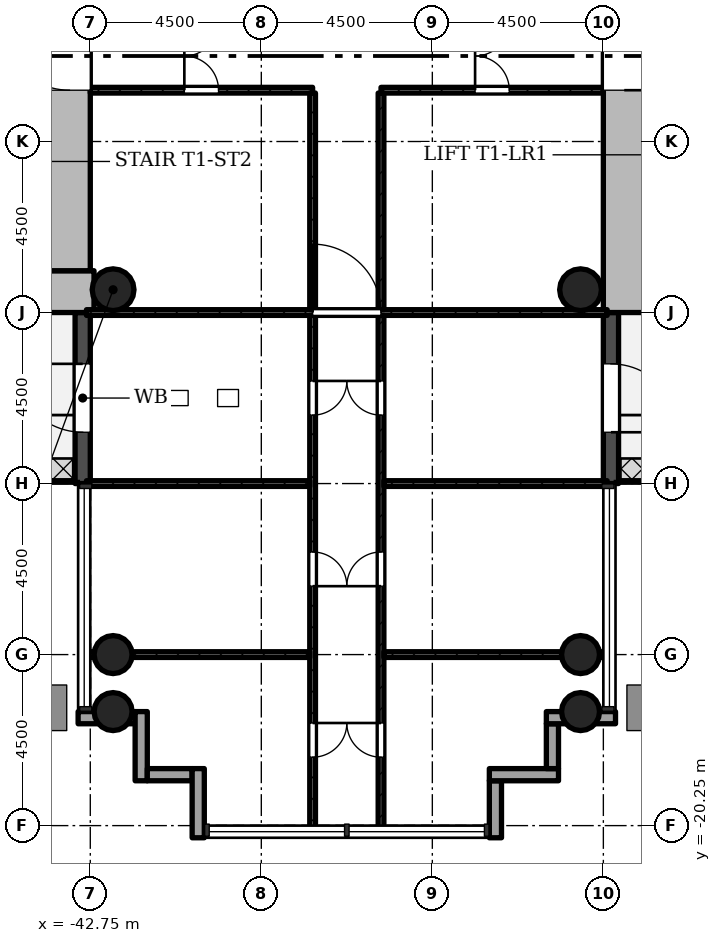
"""IFC4 building model, lengths in metres.
Left out: names, types, materials, properties, quantities, classifications, styles, units other than length and angle.
Written with IfcOpenShell. Run it as: python <this file> out.ifc"""

import sys

from ifc_helpers import new_model, si_unit, direction, frame, frame_2d, origin, origin_2d, place, context, subcontext, project, spatial, rectangle, hollow_circle, extrude, element, fill, save


model = new_model("IFC4")
c1 = context("Model", 3, precision=1e-05, world=origin(), true_north=direction((0.0, 1.0)))
c2 = subcontext(c1, "Body", "Model", "MODEL_VIEW")
j1 = project(units=[si_unit("LENGTHUNIT", "METRE"), si_unit("PLANEANGLEUNIT", "RADIAN")], contexts=[c1])
p1 = place(None, origin())
s1 = spatial("IfcSite", under=j1, at=p1, CompositionType="ELEMENT")
p2 = place(p1, origin())
s2 = spatial("IfcBuilding", under=s1, at=p2, CompositionType="ELEMENT")
p3 = place(p2, frame((0.0, 0.0, 72.1)))
s3 = spatial("IfcBuildingStorey", under=s2, at=p3, CompositionType="ELEMENT", Elevation=72.1)
p4 = place(p3, frame((-28.7, 5.65, 0.0), z_axis=(0.0, 0.0, 1.0), x_axis=(0.0, -1.0, 0.0)))
e1 = element("IfcWall", 1, at=p4, inside=s3, PredefinedType="SHEAR", context=c2, shape_type="SweptSolid", body=[
    extrude(rectangle(XDim=12.4, YDim=1.1, at=frame_2d((6.2, 0.0))), origin(), (0.0, 0.0, 1.0), 4.5),
])
p5 = place(p4, frame((4.75, 0.0, 0.0)))
e2 = element("IfcOpeningElement", 2, at=p5, cuts=e1, PredefinedType="OPENING", context=c2, shape_type="SweptSolid", body=[
    extrude(rectangle(XDim=1.8, YDim=2.1, at=frame_2d((0.9, 1.05))), frame((0.0, 0.56, 0.0), z_axis=(0.0, -1.0, 0.0), x_axis=(1.0, 0.0, 0.0)), (0.0, 0.0, 1.0), 1.12),
])
p6 = place(p3, frame((-50.65, -6.2, 0.0), z_axis=(0.0, 0.0, 1.0), x_axis=(1.0, 0.0, 0.0)))
e3 = element("IfcWall", 3, at=p6, inside=s3, PredefinedType="SHEAR", context=c2, shape_type="SweptSolid", body=[
    extrude(rectangle(XDim=7.998, YDim=1.1, at=frame_2d((3.999, 0.0))), origin(), (0.0, 0.0, 1.0), 4.5),
])
p7 = place(p3, frame((-43.3, -5.65, 0.0), z_axis=(0.0, 0.0, 1.0), x_axis=(0.0, 1.0, 0.0)))
e4 = element("IfcWall", 4, at=p7, inside=s3, PredefinedType="SHEAR", context=c2, shape_type="SweptSolid", body=[
    extrude(rectangle(XDim=12.4, YDim=1.1, at=frame_2d((6.2, 0.0))), origin(), (0.0, 0.0, 1.0), 4.5),
])
p8 = place(p7, frame((4.75, 0.0, 0.0)))
e5 = element("IfcOpeningElement", 5, at=p8, cuts=e4, PredefinedType="OPENING", context=c2, shape_type="SweptSolid", body=[
    extrude(rectangle(XDim=1.8, YDim=2.1, at=frame_2d((0.9, 1.05))), frame((0.0, 0.56, 0.0), z_axis=(0.0, -1.0, 0.0), x_axis=(1.0, 0.0, 0.0)), (0.0, 0.0, 1.0), 1.12),
])
for number, where, z_axis, x_axis in (
    (6, (-42.15, -15.75, 0.0), (0.0, 0.0, 1.0), (1.0, 0.0, 0.0)),
    (7, (-29.85, -15.75, 0.0), (0.0, 0.0, 1.0), (1.0, 0.0, 0.0)),
    (8, (-42.15, -17.25, 0.0), (0.0, 0.0, 1.0), (1.0, 0.0, 0.0)),
    (9, (-29.85, -17.25, 0.0), (0.0, 0.0, 1.0), (1.0, 0.0, 0.0)),
):
    element("IfcColumn", number, at=place(p3, frame(where, z_axis=z_axis, x_axis=x_axis)), inside=s3, PredefinedType="COLUMN", context=c2, shape_type="SweptSolid", body=[
        extrude(hollow_circle(Radius=0.5, WallThickness=0.036, at=origin_2d()), origin(), (0.0, 0.0, 1.0), 4.5),
    ])
for number, where, z_axis, x_axis in (
    (10, (-42.15, -6.15, 0.0), (0.0, 0.0, 1.0), (1.0, 0.0, 0.0)),
    (11, (-29.85, -6.15, 0.0), (0.0, 0.0, 1.0), (1.0, 0.0, 0.0)),
):
    element("IfcColumn", number, at=place(p3, frame(where, z_axis=z_axis, x_axis=x_axis)), inside=s3, PredefinedType="COLUMN", context=c2, shape_type="SweptSolid", body=[
        extrude(hollow_circle(Radius=0.55, WallThickness=0.04, at=origin_2d()), origin(), (0.0, 0.0, 1.0), 4.5),
    ])
p9 = place(p3, frame((-42.95, -6.75, -0.02), z_axis=(0.0, 0.0, 1.0), x_axis=(0.0, -1.0, 0.0)))
e12 = element("IfcWall", 12, at=p9, inside=s3, PredefinedType="STANDARD", context=c2, shape_type="SweptSolid", body=[
    extrude(rectangle(XDim=4.5, YDim=0.4, at=frame_2d((2.25, 0.0))), origin(), (0.0, 0.0, 1.0), 4.22),
])
p10 = place(p9, frame((1.35, 0.0, 0.02)))
e13 = element("IfcOpeningElement", 13, at=p10, cuts=e12, PredefinedType="OPENING", context=c2, shape_type="SweptSolid", body=[
    extrude(rectangle(XDim=1.8, YDim=2.1, at=frame_2d((0.9, 1.05))), frame((0.0, 0.21, 0.0), z_axis=(0.0, -1.0, 0.0), x_axis=(1.0, 0.0, 0.0)), (0.0, 0.0, 1.0), 0.42),
])
p11 = place(p3, frame((-43.07, -17.41, -0.3), z_axis=(0.0, 0.0, 1.0), x_axis=(1.0, 0.0, 0.0)))
e14 = element("IfcWall", 14, at=p11, inside=s3, PredefinedType="STANDARD", context=c2, shape_type="SweptSolid", body=[
    extrude(rectangle(XDim=1.5, YDim=0.32, at=frame_2d((0.75, 0.0))), origin(), (0.0, 0.0, 1.0), 4.5),
])
p12 = place(p3, frame((-41.41, -17.25, -0.3), z_axis=(0.0, 0.0, 1.0), x_axis=(0.0, -1.0, 0.0)))
e15 = element("IfcWall", 15, at=p12, inside=s3, PredefinedType="STANDARD", context=c2, shape_type="SweptSolid", body=[
    extrude(rectangle(XDim=1.82, YDim=0.32, at=frame_2d((0.91, 0.0))), origin(), (0.0, 0.0, 1.0), 4.5),
])
p13 = place(p3, frame((-41.25, -18.91, -0.3), z_axis=(0.0, 0.0, 1.0), x_axis=(1.0, 0.0, 0.0)))
e16 = element("IfcWall", 16, at=p13, inside=s3, PredefinedType="STANDARD", context=c2, shape_type="SweptSolid", body=[
    extrude(rectangle(XDim=1.18, YDim=0.32, at=frame_2d((0.59, 0.0))), origin(), (0.0, 0.0, 1.0), 4.5),
])
p14 = place(p3, frame((-39.91, -18.75, -0.3), z_axis=(0.0, 0.0, 1.0), x_axis=(0.0, -1.0, 0.0)))
e17 = element("IfcWall", 17, at=p14, inside=s3, PredefinedType="STANDARD", context=c2, shape_type="SweptSolid", body=[
    extrude(rectangle(XDim=1.82, YDim=0.32, at=frame_2d((0.91, 0.0))), origin(), (0.0, 0.0, 1.0), 4.5),
])
p15 = place(p3, frame((-32.09, -20.57, -0.3), z_axis=(0.0, 0.0, 1.0), x_axis=(0.0, 1.0, 0.0)))
e18 = element("IfcWall", 18, at=p15, inside=s3, PredefinedType="STANDARD", context=c2, shape_type="SweptSolid", body=[
    extrude(rectangle(XDim=1.5, YDim=0.32, at=frame_2d((0.75, 0.0))), origin(), (0.0, 0.0, 1.0), 4.5),
])
p16 = place(p3, frame((-32.25, -18.91, -0.3), z_axis=(0.0, 0.0, 1.0), x_axis=(1.0, 0.0, 0.0)))
e19 = element("IfcWall", 19, at=p16, inside=s3, PredefinedType="STANDARD", context=c2, shape_type="SweptSolid", body=[
    extrude(rectangle(XDim=1.82, YDim=0.32, at=frame_2d((0.91, 0.0))), origin(), (0.0, 0.0, 1.0), 4.5),
])
p17 = place(p3, frame((-30.59, -18.75, -0.3), z_axis=(0.0, 0.0, 1.0), x_axis=(0.0, 1.0, 0.0)))
e20 = element("IfcWall", 20, at=p17, inside=s3, PredefinedType="STANDARD", context=c2, shape_type="SweptSolid", body=[
    extrude(rectangle(XDim=1.18, YDim=0.32, at=frame_2d((0.59, 0.0))), origin(), (0.0, 0.0, 1.0), 4.5),
])
p18 = place(p3, frame((-30.75, -17.41, -0.3), z_axis=(0.0, 0.0, 1.0), x_axis=(1.0, 0.0, 0.0)))
e21 = element("IfcWall", 21, at=p18, inside=s3, PredefinedType="STANDARD", context=c2, shape_type="SweptSolid", body=[
    extrude(rectangle(XDim=1.82, YDim=0.32, at=frame_2d((0.91, 0.0))), origin(), (0.0, 0.0, 1.0), 4.5),
])
p19 = place(p3, frame((-29.05, -11.25, -0.02), z_axis=(0.0, 0.0, 1.0), x_axis=(0.0, 1.0, 0.0)))
e22 = element("IfcWall", 22, at=p19, inside=s3, PredefinedType="STANDARD", context=c2, shape_type="SweptSolid", body=[
    extrude(rectangle(XDim=4.5, YDim=0.4, at=frame_2d((2.25, 0.0))), origin(), (0.0, 0.0, 1.0), 4.22),
])
p20 = place(p19, frame((1.35, 0.0, 0.02)))
e23 = element("IfcOpeningElement", 23, at=p20, cuts=e22, PredefinedType="OPENING", context=c2, shape_type="SweptSolid", body=[
    extrude(rectangle(XDim=1.8, YDim=2.1, at=frame_2d((0.9, 1.05))), frame((0.0, 0.21, 0.0), z_axis=(0.0, -1.0, 0.0), x_axis=(1.0, 0.0, 0.0)), (0.0, 0.0, 1.0), 0.42),
])
p21 = place(p3, frame((-35.1, -0.9, 0.0), z_axis=(0.0, 0.0, 1.0), x_axis=(1.0, 0.0, 0.0)))
e24 = element("IfcWall", 24, at=p21, inside=s3, PredefinedType="PARTITIONING", context=c2, shape_type="SweptSolid", body=[
    extrude(rectangle(XDim=5.85, YDim=0.15, at=frame_2d((2.925, 0.0))), origin(), (0.0, 0.0, 1.0), 4.08),
])
p22 = place(p21, frame((2.475, 0.0, 0.0)))
e25 = element("IfcOpeningElement", 25, at=p22, cuts=e24, PredefinedType="OPENING", context=c2, shape_type="SweptSolid", body=[
    extrude(rectangle(XDim=0.9, YDim=2.1, at=frame_2d((0.45, 1.05))), frame((0.0, 0.085, 0.0), z_axis=(0.0, -1.0, 0.0), x_axis=(1.0, 0.0, 0.0)), (0.0, 0.0, 1.0), 0.17),
])
p23 = place(p3, frame((-35.1, -6.675, 0.0), z_axis=(0.0, 0.0, 1.0), x_axis=(0.0, 1.0, 0.0)))
e26 = element("IfcWall", 26, at=p23, inside=s3, PredefinedType="PARTITIONING", context=c2, shape_type="SweptSolid", body=[
    extrude(rectangle(XDim=5.7, YDim=0.15, at=frame_2d((2.85, 0.0))), origin(), (0.0, 0.0, 1.0), 4.08),
])
p24 = place(p3, frame((-42.75, -0.9, 0.0), z_axis=(0.0, 0.0, 1.0), x_axis=(1.0, 0.0, 0.0)))
e27 = element("IfcWall", 27, at=p24, inside=s3, PredefinedType="PARTITIONING", context=c2, shape_type="SweptSolid", body=[
    extrude(rectangle(XDim=5.85, YDim=0.15, at=frame_2d((2.925, 0.0))), origin(), (0.0, 0.0, 1.0), 4.08),
])
p25 = place(p24, frame((2.475, 0.0, 0.0)))
e28 = element("IfcOpeningElement", 28, at=p25, cuts=e27, PredefinedType="OPENING", context=c2, shape_type="SweptSolid", body=[
    extrude(rectangle(XDim=0.9, YDim=2.1, at=frame_2d((0.45, 1.05))), frame((0.0, 0.085, 0.0), z_axis=(0.0, -1.0, 0.0), x_axis=(1.0, 0.0, 0.0)), (0.0, 0.0, 1.0), 0.17),
])
p26 = place(p3, frame((-36.9, -6.675, 0.0), z_axis=(0.0, 0.0, 1.0), x_axis=(0.0, 1.0, 0.0)))
e29 = element("IfcWall", 29, at=p26, inside=s3, PredefinedType="PARTITIONING", context=c2, shape_type="SweptSolid", body=[
    extrude(rectangle(XDim=5.7, YDim=0.15, at=frame_2d((2.85, 0.0))), origin(), (0.0, 0.0, 1.0), 4.08),
])
p27 = place(p3, frame((-42.85, -6.75, 0.0), z_axis=(0.0, 0.0, 1.0), x_axis=(1.0, 0.0, 0.0)))
e30 = element("IfcWall", 30, at=p27, inside=s3, PredefinedType="PARTITIONING", context=c2, shape_type="SweptSolid", body=[
    extrude(rectangle(XDim=13.7, YDim=0.15, at=frame_2d((6.85, 0.0))), origin(), (0.0, 0.0, 1.0), 4.08),
])
p28 = place(p27, frame((5.95, 0.0, 0.0)))
e31 = element("IfcOpeningElement", 31, at=p28, cuts=e30, PredefinedType="OPENING", context=c2, shape_type="SweptSolid", body=[
    extrude(rectangle(XDim=1.8, YDim=2.1, at=frame_2d((0.9, 1.05))), frame((0.0, 0.085, 0.0), z_axis=(0.0, -1.0, 0.0), x_axis=(1.0, 0.0, 0.0)), (0.0, 0.0, 1.0), 0.17),
])
p29 = place(p3, frame((-35.1, -20.35, 0.0), z_axis=(0.0, 0.0, 1.0), x_axis=(0.0, 1.0, 0.0)))
e32 = element("IfcWall", 32, at=p29, inside=s3, PredefinedType="PARTITIONING", context=c2, shape_type="SweptSolid", body=[
    extrude(rectangle(XDim=13.525, YDim=0.15, at=frame_2d((6.763, 0.0))), origin(), (0.0, 0.0, 1.0), 4.08),
])
p30 = place(p29, frame((1.9, 0.0, 0.0)))
e33 = element("IfcOpeningElement", 33, at=p30, cuts=e32, PredefinedType="OPENING", context=c2, shape_type="SweptSolid", body=[
    extrude(rectangle(XDim=0.9, YDim=2.1, at=frame_2d((0.45, 1.05))), frame((0.0, 0.085, 0.0), z_axis=(0.0, -1.0, 0.0), x_axis=(1.0, 0.0, 0.0)), (0.0, 0.0, 1.0), 0.17),
])
p31 = place(p29, frame((6.4, 0.0, 0.0)))
e34 = element("IfcOpeningElement", 34, at=p31, cuts=e32, PredefinedType="OPENING", context=c2, shape_type="SweptSolid", body=[
    extrude(rectangle(XDim=0.9, YDim=2.1, at=frame_2d((0.45, 1.05))), frame((0.0, 0.085, 0.0), z_axis=(0.0, -1.0, 0.0), x_axis=(1.0, 0.0, 0.0)), (0.0, 0.0, 1.0), 0.17),
])
p32 = place(p29, frame((10.9, 0.0, 0.0)))
e35 = element("IfcOpeningElement", 35, at=p32, cuts=e32, PredefinedType="OPENING", context=c2, shape_type="SweptSolid", body=[
    extrude(rectangle(XDim=0.9, YDim=2.1, at=frame_2d((0.45, 1.05))), frame((0.0, 0.085, 0.0), z_axis=(0.0, -1.0, 0.0), x_axis=(1.0, 0.0, 0.0)), (0.0, 0.0, 1.0), 0.17),
])
for number, where, z_axis, x_axis in (
    (36, (-35.025, -15.75, 0.0), (0.0, 0.0, 1.0), (1.0, 0.0, 0.0)),
    (37, (-35.025, -11.25, 0.0), (0.0, 0.0, 1.0), (1.0, 0.0, 0.0)),
):
    element("IfcWall", number, at=place(p3, frame(where, z_axis=z_axis, x_axis=x_axis)), inside=s3, PredefinedType="PARTITIONING", context=c2, shape_type="SweptSolid", body=[
        extrude(rectangle(XDim=5.875, YDim=0.15, at=frame_2d((2.938, 0.0))), origin(), (0.0, 0.0, 1.0), 4.08),
    ])
p33 = place(p3, frame((-36.9, -20.35, 0.0), z_axis=(0.0, 0.0, 1.0), x_axis=(0.0, 1.0, 0.0)))
e38 = element("IfcWall", 38, at=p33, inside=s3, PredefinedType="PARTITIONING", context=c2, shape_type="SweptSolid", body=[
    extrude(rectangle(XDim=13.525, YDim=0.15, at=frame_2d((6.763, 0.0))), origin(), (0.0, 0.0, 1.0), 4.08),
])
p34 = place(p33, frame((1.9, 0.0, 0.0)))
e39 = element("IfcOpeningElement", 39, at=p34, cuts=e38, PredefinedType="OPENING", context=c2, shape_type="SweptSolid", body=[
    extrude(rectangle(XDim=0.9, YDim=2.1, at=frame_2d((0.45, 1.05))), frame((0.0, 0.085, 0.0), z_axis=(0.0, -1.0, 0.0), x_axis=(1.0, 0.0, 0.0)), (0.0, 0.0, 1.0), 0.17),
])
p35 = place(p33, frame((6.4, 0.0, 0.0)))
e40 = element("IfcOpeningElement", 40, at=p35, cuts=e38, PredefinedType="OPENING", context=c2, shape_type="SweptSolid", body=[
    extrude(rectangle(XDim=0.9, YDim=2.1, at=frame_2d((0.45, 1.05))), frame((0.0, 0.085, 0.0), z_axis=(0.0, -1.0, 0.0), x_axis=(1.0, 0.0, 0.0)), (0.0, 0.0, 1.0), 0.17),
])
p36 = place(p33, frame((10.9, 0.0, 0.0)))
e41 = element("IfcOpeningElement", 41, at=p36, cuts=e38, PredefinedType="OPENING", context=c2, shape_type="SweptSolid", body=[
    extrude(rectangle(XDim=0.9, YDim=2.1, at=frame_2d((0.45, 1.05))), frame((0.0, 0.085, 0.0), z_axis=(0.0, -1.0, 0.0), x_axis=(1.0, 0.0, 0.0)), (0.0, 0.0, 1.0), 0.17),
])
for number, where, z_axis, x_axis in (
    (42, (-36.975, -15.75, 0.0), (0.0, 0.0, 1.0), (-1.0, 0.0, 0.0)),
    (43, (-36.975, -11.25, 0.0), (0.0, 0.0, 1.0), (-1.0, 0.0, 0.0)),
):
    element("IfcWall", number, at=place(p3, frame(where, z_axis=z_axis, x_axis=x_axis)), inside=s3, PredefinedType="PARTITIONING", context=c2, shape_type="SweptSolid", body=[
        extrude(rectangle(XDim=5.875, YDim=0.15, at=frame_2d((2.938, 0.0))), origin(), (0.0, 0.0, 1.0), 4.08),
    ])
p37 = place(p10, origin())
e44 = element("IfcDoor", 44, at=p37, inside=s3, OperationType="SINGLE_SWING_LEFT", PredefinedType="DOOR", context=c2, shape_type="SweptSolid", body=[
    extrude(rectangle(XDim=1.8, YDim=2.1, at=frame_2d((0.9, 1.05))), frame((0.0, 0.025, 0.0), z_axis=(0.0, -1.0, 0.0), x_axis=(1.0, 0.0, 0.0)), (0.0, 0.0, 1.0), 0.05),
])
fill(e13, e44)
p38 = place(p20, origin())
e45 = element("IfcDoor", 45, at=p38, inside=s3, OperationType="SINGLE_SWING_LEFT", PredefinedType="DOOR", context=c2, shape_type="SweptSolid", body=[
    extrude(rectangle(XDim=1.8, YDim=2.1, at=frame_2d((0.9, 1.05))), frame((0.0, 0.025, 0.0), z_axis=(0.0, -1.0, 0.0), x_axis=(1.0, 0.0, 0.0)), (0.0, 0.0, 1.0), 0.05),
])
fill(e23, e45)
p39 = place(p22, origin())
e46 = element("IfcDoor", 46, at=p39, inside=s3, OperationType="SINGLE_SWING_RIGHT", PredefinedType="DOOR", context=c2, shape_type="SweptSolid", body=[
    extrude(rectangle(XDim=0.9, YDim=2.1, at=frame_2d((0.45, 1.05))), frame((0.0, 0.025, 0.0), z_axis=(0.0, -1.0, 0.0), x_axis=(1.0, 0.0, 0.0)), (0.0, 0.0, 1.0), 0.05),
])
fill(e25, e46)
p40 = place(p25, origin())
e47 = element("IfcDoor", 47, at=p40, inside=s3, OperationType="SINGLE_SWING_RIGHT", PredefinedType="DOOR", context=c2, shape_type="SweptSolid", body=[
    extrude(rectangle(XDim=0.9, YDim=2.1, at=frame_2d((0.45, 1.05))), frame((0.0, 0.025, 0.0), z_axis=(0.0, -1.0, 0.0), x_axis=(1.0, 0.0, 0.0)), (0.0, 0.0, 1.0), 0.05),
])
fill(e28, e47)
p41 = place(p28, origin())
e48 = element("IfcDoor", 48, at=p41, inside=s3, OperationType="SINGLE_SWING_RIGHT", PredefinedType="DOOR", context=c2, shape_type="SweptSolid", body=[
    extrude(rectangle(XDim=1.8, YDim=2.1, at=frame_2d((0.9, 1.05))), frame((0.0, 0.025, 0.0), z_axis=(0.0, -1.0, 0.0), x_axis=(1.0, 0.0, 0.0)), (0.0, 0.0, 1.0), 0.05),
])
fill(e31, e48)
p42 = place(p30, origin())
e49 = element("IfcDoor", 49, at=p42, inside=s3, OperationType="SINGLE_SWING_LEFT", PredefinedType="DOOR", context=c2, shape_type="SweptSolid", body=[
    extrude(rectangle(XDim=0.9, YDim=2.1, at=frame_2d((0.45, 1.05))), frame((0.0, 0.025, 0.0), z_axis=(0.0, -1.0, 0.0), x_axis=(1.0, 0.0, 0.0)), (0.0, 0.0, 1.0), 0.05),
])
fill(e33, e49)
p43 = place(p31, origin())
e50 = element("IfcDoor", 50, at=p43, inside=s3, OperationType="SINGLE_SWING_RIGHT", PredefinedType="DOOR", context=c2, shape_type="SweptSolid", body=[
    extrude(rectangle(XDim=0.9, YDim=2.1, at=frame_2d((0.45, 1.05))), frame((0.0, 0.025, 0.0), z_axis=(0.0, -1.0, 0.0), x_axis=(1.0, 0.0, 0.0)), (0.0, 0.0, 1.0), 0.05),
])
fill(e34, e50)
p44 = place(p32, origin())
e51 = element("IfcDoor", 51, at=p44, inside=s3, OperationType="SINGLE_SWING_LEFT", PredefinedType="DOOR", context=c2, shape_type="SweptSolid", body=[
    extrude(rectangle(XDim=0.9, YDim=2.1, at=frame_2d((0.45, 1.05))), frame((0.0, 0.025, 0.0), z_axis=(0.0, -1.0, 0.0), x_axis=(1.0, 0.0, 0.0)), (0.0, 0.0, 1.0), 0.05),
])
fill(e35, e51)
p45 = place(p34, origin())
e52 = element("IfcDoor", 52, at=p45, inside=s3, OperationType="SINGLE_SWING_RIGHT", PredefinedType="DOOR", context=c2, shape_type="SweptSolid", body=[
    extrude(rectangle(XDim=0.9, YDim=2.1, at=frame_2d((0.45, 1.05))), frame((0.0, 0.025, 0.0), z_axis=(0.0, -1.0, 0.0), x_axis=(1.0, 0.0, 0.0)), (0.0, 0.0, 1.0), 0.05),
])
fill(e39, e52)
p46 = place(p35, origin())
e53 = element("IfcDoor", 53, at=p46, inside=s3, OperationType="SINGLE_SWING_LEFT", PredefinedType="DOOR", context=c2, shape_type="SweptSolid", body=[
    extrude(rectangle(XDim=0.9, YDim=2.1, at=frame_2d((0.45, 1.05))), frame((0.0, 0.025, 0.0), z_axis=(0.0, -1.0, 0.0), x_axis=(1.0, 0.0, 0.0)), (0.0, 0.0, 1.0), 0.05),
])
fill(e40, e53)
p47 = place(p36, origin())
e54 = element("IfcDoor", 54, at=p47, inside=s3, OperationType="SINGLE_SWING_RIGHT", PredefinedType="DOOR", context=c2, shape_type="SweptSolid", body=[
    extrude(rectangle(XDim=0.9, YDim=2.1, at=frame_2d((0.45, 1.05))), frame((0.0, 0.025, 0.0), z_axis=(0.0, -1.0, 0.0), x_axis=(1.0, 0.0, 0.0)), (0.0, 0.0, 1.0), 0.05),
])
fill(e41, e54)
p48 = place(p5, origin())
e55 = element("IfcDoor", 55, at=p48, inside=s3, OperationType="SINGLE_SWING_LEFT", PredefinedType="DOOR", context=c2, shape_type="SweptSolid", body=[
    extrude(rectangle(XDim=1.8, YDim=2.1, at=frame_2d((0.9, 1.05))), frame((0.0, 0.025, 0.0), z_axis=(0.0, -1.0, 0.0), x_axis=(1.0, 0.0, 0.0)), (0.0, 0.0, 1.0), 0.05),
])
fill(e2, e55)
p49 = place(p8, origin())
e56 = element("IfcDoor", 56, at=p49, inside=s3, OperationType="SINGLE_SWING_LEFT", PredefinedType="DOOR", context=c2, shape_type="SweptSolid", body=[
    extrude(rectangle(XDim=1.8, YDim=2.1, at=frame_2d((0.9, 1.05))), frame((0.0, 0.025, 0.0), z_axis=(0.0, -1.0, 0.0), x_axis=(1.0, 0.0, 0.0)), (0.0, 0.0, 1.0), 0.05),
])
fill(e5, e56)
save(model, sys.argv[1])
